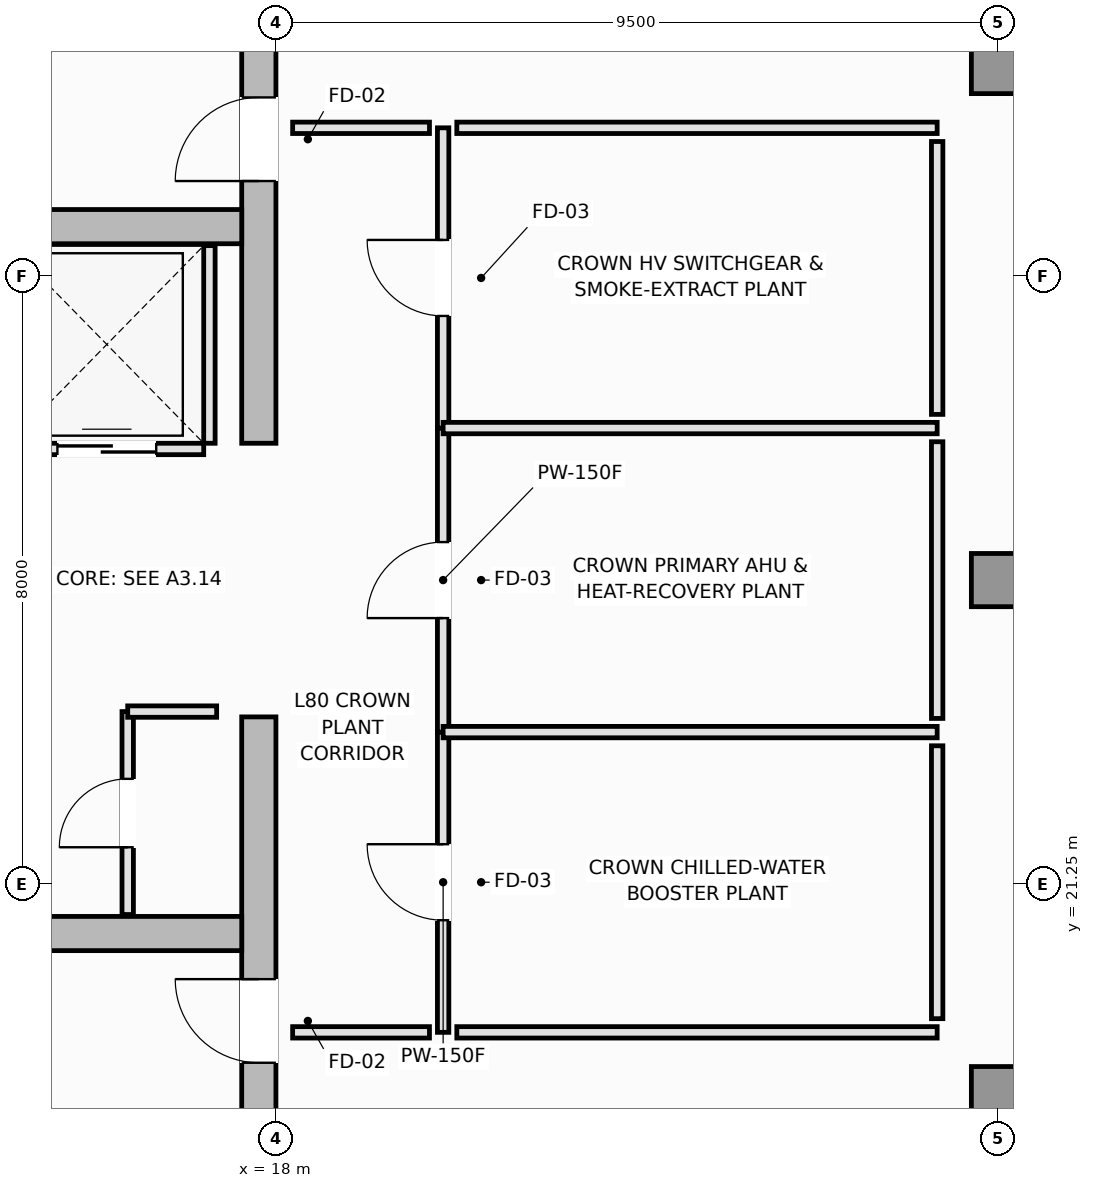
"""IFC4 building model, lengths in metres.
Left out: names, types, materials, properties, quantities, classifications, styles, units other than length and angle.
Written with IfcOpenShell. Run it as: python <this file> out.ifc"""

import sys

from ifc_helpers import new_model, si_unit, direction, frame, frame_2d, origin, origin_2d, place, context, subcontext, project, spatial, rectangle, extrude, element, fill, save


model = new_model("IFC4")
c1 = context("Model", 3, precision=1e-05, world=origin(), true_north=direction((0.0, 1.0)))
c2 = subcontext(c1, "Body", "Model", "MODEL_VIEW")
j1 = project(units=[si_unit("LENGTHUNIT", "METRE"), si_unit("PLANEANGLEUNIT", "RADIAN")], contexts=[c1])
p1 = place(None, origin())
s1 = spatial("IfcSite", under=j1, at=p1, CompositionType="ELEMENT")
p2 = place(p1, origin())
s2 = spatial("IfcBuilding", under=s1, at=p2, CompositionType="ELEMENT")
p3 = place(p2, frame((0.0, 0.0, 303.05)))
s3 = spatial("IfcBuildingStorey", under=s2, at=p3, CompositionType="ELEMENT", Elevation=303.05)
p4 = place(p3, frame((17.775, 14.45, 0.0), z_axis=(0.0, 0.0, 1.0), x_axis=(0.0, 1.0, 0.0)))
e1 = element("IfcWall", 1, at=p4, inside=s3, PredefinedType="SHEAR", context=c2, shape_type="SweptSolid", body=[
    extrude(rectangle(XDim=9.0, YDim=0.45, at=frame_2d((4.5, 0.0))), origin(), (0.0, 0.0, 1.0), 4.5),
])
p5 = place(p4, frame((4.45, 0.0, 0.0)))
e2 = element("IfcOpeningElement", 2, at=p5, cuts=e1, PredefinedType="OPENING", context=c2, shape_type="SweptSolid", body=[
    extrude(rectangle(XDim=1.1, YDim=2.15, at=frame_2d((0.55, 1.075))), frame((0.0, 0.235, 0.0), z_axis=(0.0, -1.0, 0.0), x_axis=(1.0, 0.0, 0.0)), (0.0, 0.0, 1.0), 0.47),
])
p6 = place(p3, frame((17.775, 27.05, 0.0), z_axis=(0.0, 0.0, 1.0), x_axis=(0.0, 1.0, 0.0)))
e3 = element("IfcWall", 3, at=p6, inside=s3, PredefinedType="SHEAR", context=c2, shape_type="SweptSolid", body=[
    extrude(rectangle(XDim=9.0, YDim=0.45, at=frame_2d((4.5, 0.0))), origin(), (0.0, 0.0, 1.0), 4.5),
])
p7 = place(p6, frame((3.45, 0.0, 0.0)))
e4 = element("IfcOpeningElement", 4, at=p7, cuts=e3, PredefinedType="OPENING", context=c2, shape_type="SweptSolid", body=[
    extrude(rectangle(XDim=1.1, YDim=2.15, at=frame_2d((0.55, 1.075))), frame((0.0, 0.235, 0.0), z_axis=(0.0, -1.0, 0.0), x_axis=(1.0, 0.0, 0.0)), (0.0, 0.0, 1.0), 0.47),
])
for number, where, z_axis, x_axis in (
    (5, (4.95, 20.6, 0.0), (0.0, 0.0, 1.0), (1.0, 0.0, 0.0)),
    (6, (4.95, 29.9, 0.0), (0.0, 0.0, 1.0), (1.0, 0.0, 0.0)),
):
    element("IfcWall", number, at=place(p3, frame(where, z_axis=z_axis, x_axis=x_axis)), inside=s3, PredefinedType="SHEAR", context=c2, shape_type="SweptSolid", body=[
        extrude(rectangle(XDim=12.6, YDim=0.45, at=frame_2d((6.3, 0.0))), origin(), (0.0, 0.0, 1.0), 4.5),
    ])
for number, where, z_axis, x_axis in (
    (7, (27.5, 18.5, 0.0), (0.0, 0.0, 1.0), (1.0, 0.0, 0.0)),
    (8, (27.5, 25.25, 0.0), (0.0, 0.0, 1.0), (1.0, 0.0, 0.0)),
    (9, (27.5, 32.0, 0.0), (0.0, 0.0, 1.0), (1.0, 0.0, 0.0)),
):
    element("IfcColumn", number, at=place(p3, frame(where, z_axis=z_axis, x_axis=x_axis)), inside=s3, PredefinedType="COLUMN", context=c2, shape_type="SweptSolid", body=[
        extrude(rectangle(XDim=0.7, YDim=0.7, at=origin_2d()), origin(), (0.0, 0.0, 1.0), 4.5),
    ])
p8 = place(p3, frame((14.5, 26.975, 0.0), z_axis=(0.0, 0.0, 1.0), x_axis=(1.0, 0.0, 0.0)))
e10 = element("IfcWall", 10, at=p8, inside=s3, PredefinedType="PARTITIONING", context=c2, shape_type="SweptSolid", body=[
    extrude(rectangle(XDim=2.55, YDim=0.15, at=frame_2d((1.275, 0.0))), origin(), (0.0, 0.0, 1.0), 4.3),
])
p9 = place(p8, frame((0.625, 0.0, 0.0)))
e11 = element("IfcOpeningElement", 11, at=p9, cuts=e10, PredefinedType="OPENING", context=c2, shape_type="SweptSolid", body=[
    extrude(rectangle(XDim=1.3, YDim=2.2, at=frame_2d((0.65, 1.1))), frame((0.0, 0.085, 0.0), z_axis=(0.0, -1.0, 0.0), x_axis=(1.0, 0.0, 0.0)), (0.0, 0.0, 1.0), 0.17),
])
p10 = place(p3, frame((17.125, 27.05, 0.0), z_axis=(0.0, 0.0, 1.0), x_axis=(0.0, 1.0, 0.0)))
e12 = element("IfcWall", 12, at=p10, inside=s3, PredefinedType="PARTITIONING", context=c2, shape_type="SweptSolid", body=[
    extrude(rectangle(XDim=2.6, YDim=0.15, at=frame_2d((1.3, 0.0))), origin(), (0.0, 0.0, 1.0), 4.3),
])
p11 = place(p3, frame((16.05, 20.85, 0.0), z_axis=(0.0, 0.0, 1.0), x_axis=(0.0, 1.0, 0.0)))
e13 = element("IfcWall", 13, at=p11, inside=s3, PredefinedType="PARTITIONING", context=c2, shape_type="SweptSolid", body=[
    extrude(rectangle(XDim=2.67, YDim=0.15, at=frame_2d((1.335, 0.0))), origin(), (0.0, 0.0, 1.0), 4.3),
])
p12 = place(p11, frame((0.885, 0.0, 0.0)))
e14 = element("IfcOpeningElement", 14, at=p12, cuts=e13, PredefinedType="OPENING", context=c2, shape_type="SweptSolid", body=[
    extrude(rectangle(XDim=0.9, YDim=2.1, at=frame_2d((0.45, 1.05))), frame((0.0, 0.085, 0.0), z_axis=(0.0, -1.0, 0.0), x_axis=(1.0, 0.0, 0.0)), (0.0, 0.0, 1.0), 0.17),
])
p13 = place(p3, frame((16.05, 23.52, 0.0), z_axis=(0.0, 0.0, 1.0), x_axis=(1.0, 0.0, 0.0)))
e15 = element("IfcWall", 15, at=p13, inside=s3, PredefinedType="PARTITIONING", context=c2, shape_type="SweptSolid", body=[
    extrude(rectangle(XDim=1.17, YDim=0.15, at=frame_2d((0.585, 0.0))), origin(), (0.0, 0.0, 1.0), 4.3),
])
p14 = place(p3, frame((20.2, 19.3, 0.0), z_axis=(0.0, 0.0, 1.0), x_axis=(0.0, 1.0, 0.0)))
e16 = element("IfcWall", 16, at=p14, inside=s3, PredefinedType="PARTITIONING", context=c2, shape_type="SweptSolid", body=[
    extrude(rectangle(XDim=3.95, YDim=0.15, at=frame_2d((1.975, 0.0))), origin(), (0.0, 0.0, 1.0), 4.3),
])
p15 = place(p14, frame((1.475, 0.0, 0.0)))
e17 = element("IfcOpeningElement", 17, at=p15, cuts=e16, PredefinedType="OPENING", context=c2, shape_type="SweptSolid", body=[
    extrude(rectangle(XDim=1.0, YDim=2.15, at=frame_2d((0.5, 1.075))), frame((0.0, 0.085, 0.0), z_axis=(0.0, -1.0, 0.0), x_axis=(1.0, 0.0, 0.0)), (0.0, 0.0, 1.0), 0.17),
])
p16 = place(p3, frame((20.2, 23.25, 0.0), z_axis=(0.0, 0.0, 1.0), x_axis=(0.0, 1.0, 0.0)))
e18 = element("IfcWall", 18, at=p16, inside=s3, PredefinedType="PARTITIONING", context=c2, shape_type="SweptSolid", body=[
    extrude(rectangle(XDim=4.0, YDim=0.15, at=frame_2d((2.0, 0.0))), origin(), (0.0, 0.0, 1.0), 4.3),
])
p17 = place(p16, frame((1.5, 0.0, 0.0)))
e19 = element("IfcOpeningElement", 19, at=p17, cuts=e18, PredefinedType="OPENING", context=c2, shape_type="SweptSolid", body=[
    extrude(rectangle(XDim=1.0, YDim=2.15, at=frame_2d((0.5, 1.075))), frame((0.0, 0.085, 0.0), z_axis=(0.0, -1.0, 0.0), x_axis=(1.0, 0.0, 0.0)), (0.0, 0.0, 1.0), 0.17),
])
p18 = place(p3, frame((20.2, 27.25, 0.0), z_axis=(0.0, 0.0, 1.0), x_axis=(0.0, 1.0, 0.0)))
e20 = element("IfcWall", 20, at=p18, inside=s3, PredefinedType="PARTITIONING", context=c2, shape_type="SweptSolid", body=[
    extrude(rectangle(XDim=3.95, YDim=0.15, at=frame_2d((1.975, 0.0))), origin(), (0.0, 0.0, 1.0), 4.3),
])
p19 = place(p18, frame((1.475, 0.0, 0.0)))
e21 = element("IfcOpeningElement", 21, at=p19, cuts=e20, PredefinedType="OPENING", context=c2, shape_type="SweptSolid", body=[
    extrude(rectangle(XDim=1.0, YDim=2.15, at=frame_2d((0.5, 1.075))), frame((0.0, 0.085, 0.0), z_axis=(0.0, -1.0, 0.0), x_axis=(1.0, 0.0, 0.0)), (0.0, 0.0, 1.0), 0.17),
])
for number, where, z_axis, x_axis in (
    (22, (20.2, 23.25, 0.0), (0.0, 0.0, 1.0), (1.0, 0.0, 0.0)),
    (23, (20.2, 27.25, 0.0), (0.0, 0.0, 1.0), (1.0, 0.0, 0.0)),
):
    element("IfcWall", number, at=place(p3, frame(where, z_axis=z_axis, x_axis=x_axis)), inside=s3, PredefinedType="PARTITIONING", context=c2, shape_type="SweptSolid", body=[
        extrude(rectangle(XDim=6.5, YDim=0.15, at=frame_2d((3.25, 0.0))), origin(), (0.0, 0.0, 1.0), 4.3),
    ])
p20 = place(p3, frame((26.7, 19.3, 0.0), z_axis=(0.0, 0.0, 1.0), x_axis=(-1.0, 0.0, 0.0)))
e24 = element("IfcWall", 24, at=p20, inside=s3, PredefinedType="PARTITIONING", context=c2, shape_type="SweptSolid", body=[
    extrude(rectangle(XDim=6.32, YDim=0.15, at=frame_2d((3.16, 0.0))), origin(), (0.0, 0.0, 1.0), 4.3),
])
for number, where, z_axis, x_axis in (
    (25, (20.02, 19.3, 0.0), (0.0, 0.0, 1.0), (-1.0, 0.0, 0.0)),
    (26, (18.22, 31.2, 0.0), (0.0, 0.0, 1.0), (1.0, 0.0, 0.0)),
):
    element("IfcWall", number, at=place(p3, frame(where, z_axis=z_axis, x_axis=x_axis)), inside=s3, PredefinedType="PARTITIONING", context=c2, shape_type="SweptSolid", body=[
        extrude(rectangle(XDim=1.8, YDim=0.15, at=frame_2d((0.9, 0.0))), origin(), (0.0, 0.0, 1.0), 4.3),
    ])
p21 = place(p3, frame((20.38, 31.2, 0.0), z_axis=(0.0, 0.0, 1.0), x_axis=(1.0, 0.0, 0.0)))
e27 = element("IfcWall", 27, at=p21, inside=s3, PredefinedType="PARTITIONING", context=c2, shape_type="SweptSolid", body=[
    extrude(rectangle(XDim=6.32, YDim=0.15, at=frame_2d((3.16, 0.0))), origin(), (0.0, 0.0, 1.0), 4.3),
])
p22 = place(p3, frame((26.7, 31.02, 0.0), z_axis=(0.0, 0.0, 1.0), x_axis=(0.0, -1.0, 0.0)))
e28 = element("IfcWall", 28, at=p22, inside=s3, PredefinedType="PARTITIONING", context=c2, shape_type="SweptSolid", body=[
    extrude(rectangle(XDim=3.59, YDim=0.15, at=frame_2d((1.795, 0.0))), origin(), (0.0, 0.0, 1.0), 4.3),
])
p23 = place(p3, frame((26.7, 27.07, 0.0), z_axis=(0.0, 0.0, 1.0), x_axis=(0.0, -1.0, 0.0)))
e29 = element("IfcWall", 29, at=p23, inside=s3, PredefinedType="PARTITIONING", context=c2, shape_type="SweptSolid", body=[
    extrude(rectangle(XDim=3.64, YDim=0.15, at=frame_2d((1.82, 0.0))), origin(), (0.0, 0.0, 1.0), 4.3),
])
p24 = place(p3, frame((26.7, 23.07, 0.0), z_axis=(0.0, 0.0, 1.0), x_axis=(0.0, -1.0, 0.0)))
e30 = element("IfcWall", 30, at=p24, inside=s3, PredefinedType="PARTITIONING", context=c2, shape_type="SweptSolid", body=[
    extrude(rectangle(XDim=3.59, YDim=0.15, at=frame_2d((1.795, 0.0))), origin(), (0.0, 0.0, 1.0), 4.3),
])
p25 = place(p9, origin())
e31 = element("IfcDoor", 31, at=p25, inside=s3, OperationType="DOUBLE_DOOR_SLIDING", PredefinedType="DOOR", context=c2, shape_type="SweptSolid", body=[
    extrude(rectangle(XDim=1.3, YDim=2.2, at=frame_2d((0.65, 1.1))), frame((0.0, 0.025, 0.0), z_axis=(0.0, -1.0, 0.0), x_axis=(1.0, 0.0, 0.0)), (0.0, 0.0, 1.0), 0.05),
])
fill(e11, e31)
p26 = place(p5, origin())
e32 = element("IfcDoor", 32, at=p26, inside=s3, OperationType="SINGLE_SWING_RIGHT", PredefinedType="DOOR", context=c2, shape_type="SweptSolid", body=[
    extrude(rectangle(XDim=1.1, YDim=2.15, at=frame_2d((0.55, 1.075))), frame((0.0, 0.025, 0.0), z_axis=(0.0, -1.0, 0.0), x_axis=(1.0, 0.0, 0.0)), (0.0, 0.0, 1.0), 0.05),
])
fill(e2, e32)
p27 = place(p7, origin())
e33 = element("IfcDoor", 33, at=p27, inside=s3, OperationType="SINGLE_SWING_LEFT", PredefinedType="DOOR", context=c2, shape_type="SweptSolid", body=[
    extrude(rectangle(XDim=1.1, YDim=2.15, at=frame_2d((0.55, 1.075))), frame((0.0, 0.025, 0.0), z_axis=(0.0, -1.0, 0.0), x_axis=(1.0, 0.0, 0.0)), (0.0, 0.0, 1.0), 0.05),
])
fill(e4, e33)
p28 = place(p12, origin())
e34 = element("IfcDoor", 34, at=p28, inside=s3, OperationType="SINGLE_SWING_LEFT", PredefinedType="DOOR", context=c2, shape_type="SweptSolid", body=[
    extrude(rectangle(XDim=0.9, YDim=2.1, at=frame_2d((0.45, 1.05))), frame((0.0, 0.025, 0.0), z_axis=(0.0, -1.0, 0.0), x_axis=(1.0, 0.0, 0.0)), (0.0, 0.0, 1.0), 0.05),
])
fill(e14, e34)
p29 = place(p15, origin())
e35 = element("IfcDoor", 35, at=p29, inside=s3, OperationType="SINGLE_SWING_RIGHT", PredefinedType="DOOR", context=c2, shape_type="SweptSolid", body=[
    extrude(rectangle(XDim=1.0, YDim=2.15, at=frame_2d((0.5, 1.075))), frame((0.0, 0.025, 0.0), z_axis=(0.0, -1.0, 0.0), x_axis=(1.0, 0.0, 0.0)), (0.0, 0.0, 1.0), 0.05),
])
fill(e17, e35)
p30 = place(p17, origin())
e36 = element("IfcDoor", 36, at=p30, inside=s3, OperationType="SINGLE_SWING_LEFT", PredefinedType="DOOR", context=c2, shape_type="SweptSolid", body=[
    extrude(rectangle(XDim=1.0, YDim=2.15, at=frame_2d((0.5, 1.075))), frame((0.0, 0.025, 0.0), z_axis=(0.0, -1.0, 0.0), x_axis=(1.0, 0.0, 0.0)), (0.0, 0.0, 1.0), 0.05),
])
fill(e19, e36)
p31 = place(p19, origin())
e37 = element("IfcDoor", 37, at=p31, inside=s3, OperationType="SINGLE_SWING_RIGHT", PredefinedType="DOOR", context=c2, shape_type="SweptSolid", body=[
    extrude(rectangle(XDim=1.0, YDim=2.15, at=frame_2d((0.5, 1.075))), frame((0.0, 0.025, 0.0), z_axis=(0.0, -1.0, 0.0), x_axis=(1.0, 0.0, 0.0)), (0.0, 0.0, 1.0), 0.05),
])
fill(e21, e37)
save(model, sys.argv[1])
